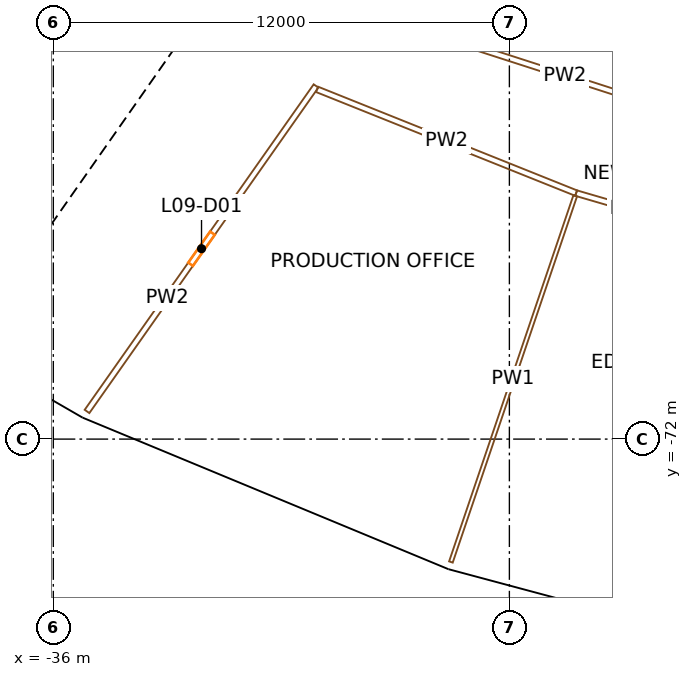
"""IFC4 building model, lengths in metres.
Left out: names, types, materials, properties, quantities, classifications, styles, units other than length and angle.
Written with IfcOpenShell. Run it as: python <this file> out.ifc"""

import sys

from ifc_helpers import new_model, si_unit, direction, frame, frame_2d, origin, origin_2d, place, context, subcontext, project, spatial, rectangle, extrude, element, fill, save


model = new_model("IFC4")
c1 = context("Model", 3, precision=1e-05, world=origin(), true_north=direction((0.0, 1.0)))
c2 = subcontext(c1, "Body", "Model", "MODEL_VIEW")
j1 = project(units=[si_unit("LENGTHUNIT", "METRE"), si_unit("PLANEANGLEUNIT", "RADIAN")], contexts=[c1])
p1 = place(None, origin())
s1 = spatial("IfcSite", under=j1, at=p1, CompositionType="ELEMENT")
p2 = place(p1, origin())
s2 = spatial("IfcBuilding", under=s1, at=p2, CompositionType="ELEMENT")
p3 = place(p2, frame((0.0, 0.0, 51.9)))
s3 = spatial("IfcBuildingStorey", under=s2, at=p3, CompositionType="ELEMENT", Elevation=51.9)
for number, where, z_axis, x_axis in (
    (1, (-34.388, -69.732, 0.0), (0.0, 0.0, 1.0), (0.897, -0.442, 0.0)),
    (2, (-24.992, -73.624, 0.0), (0.0, 0.0, 1.0), (0.947, -0.321, 0.0)),
):
    element("IfcColumn", number, at=place(p3, frame(where, z_axis=z_axis, x_axis=x_axis)), inside=s3, PredefinedType="COLUMN", context=c2, shape_type="SweptSolid", body=[
        extrude(rectangle(XDim=1.3, YDim=1.7, at=origin_2d()), origin(), (0.0, 0.0, 1.0), 3.8),
    ])
p4 = place(p3, frame((-36.717, -66.337, 0.0), z_axis=(0.0, 0.0, 1.0), x_axis=(0.573577477574, 0.819151315216, 0.0)))
e3 = element("IfcWall", 3, at=p4, inside=s3, PredefinedType="SHEAR", context=c2, shape_type="SweptSolid", body=[
    extrude(rectangle(XDim=14.8, YDim=0.9, at=frame_2d((7.4, 0.0))), origin(), (0.0, 0.0, 1.0), 3.5),
])
p5 = place(p4, frame((6.2, 0.0, 0.0)))
e4 = element("IfcOpeningElement", 4, at=p5, cuts=e3, PredefinedType="OPENING", context=c2, shape_type="SweptSolid", body=[
    extrude(rectangle(XDim=2.4, YDim=2.1, at=frame_2d((1.2, 1.05))), frame((0.0, 0.46, 0.0), z_axis=(0.0, -1.0, 0.0), x_axis=(1.0, 0.0, 0.0)), (0.0, 0.0, 1.0), 0.92),
])
p6 = place(p3, frame((-35.221, -63.417, 0.0), z_axis=(0.0, 0.0, 1.0), x_axis=(-0.819166993208, 0.573555086491, 0.0)))
e5 = element("IfcWall", 5, at=p6, inside=s3, PredefinedType="SOLIDWALL", context=c2, shape_type="SweptSolid", body=[
    extrude(rectangle(XDim=7.95, YDim=0.3, at=frame_2d((3.975, 0.0))), origin(), (0.0, 0.0, 1.0), 3.5),
])
p7 = place(p3, frame((-29.088, -62.708, 0.0), z_axis=(0.0, 0.0, 1.0), x_axis=(-0.575411972256, -0.817863718589, 0.0)))
e6 = element("IfcWall", 6, at=p7, inside=s3, PredefinedType="PARTITIONING", context=c2, shape_type="SweptSolid", body=[
    extrude(rectangle(XDim=10.471, YDim=0.15, at=frame_2d((5.236, 0.0))), origin(), (0.0, 0.0, 1.0), 2.4),
])
p8 = place(p7, frame((4.736, 0.0, 0.0)))
e7 = element("IfcOpeningElement", 7, at=p8, cuts=e6, PredefinedType="OPENING", context=c2, shape_type="SweptSolid", body=[
    extrude(rectangle(XDim=1.0, YDim=2.1, at=frame_2d((0.5, 1.05))), frame((0.0, 0.085, 0.0), z_axis=(0.0, -1.0, 0.0), x_axis=(1.0, 0.0, 0.0)), (0.0, 0.0, 1.0), 0.17),
])
p9 = place(p3, frame((-29.061, -62.798, 0.0), z_axis=(0.0, 0.0, 1.0), x_axis=(0.928339065762, -0.371734554462, 0.0)))
e8 = element("IfcWall", 8, at=p9, inside=s3, PredefinedType="PARTITIONING", context=c2, shape_type="SweptSolid", body=[
    extrude(rectangle(XDim=7.344, YDim=0.15, at=frame_2d((3.672, 0.0))), origin(), (0.0, 0.0, 1.0), 2.4),
])
p10 = place(p3, frame((-27.656, -60.797, 0.0), z_axis=(0.0, 0.0, 1.0), x_axis=(0.951666530015, -0.307133221338, 0.0)))
e9 = element("IfcWall", 9, at=p10, inside=s3, PredefinedType="PARTITIONING", context=c2, shape_type="SweptSolid", body=[
    extrude(rectangle(XDim=15.366, YDim=0.15, at=frame_2d((7.683, 0.0))), origin(), (0.0, 0.0, 1.0), 2.4),
])
p11 = place(p10, frame((6.783, 0.0, 0.0)))
e10 = element("IfcOpeningElement", 10, at=p11, cuts=e9, PredefinedType="OPENING", context=c2, shape_type="SweptSolid", body=[
    extrude(rectangle(XDim=1.8, YDim=2.1, at=frame_2d((0.9, 1.05))), frame((0.0, 0.085, 0.0), z_axis=(0.0, -1.0, 0.0), x_axis=(1.0, 0.0, 0.0)), (0.0, 0.0, 1.0), 0.17),
])
p12 = place(p3, frame((-25.538, -75.234, 0.0), z_axis=(0.0, 0.0, 1.0), x_axis=(0.32142736677, 0.946934236308, 0.0)))
e11 = element("IfcWall", 11, at=p12, inside=s3, PredefinedType="PARTITIONING", context=c2, shape_type="SweptSolid", body=[
    extrude(rectangle(XDim=10.175, YDim=0.1, at=frame_2d((5.087, 0.0))), origin(), (0.0, 0.0, 1.0), 2.4),
])
p13 = place(p3, frame((-16.446, -67.217, 0.0), z_axis=(0.0, 0.0, 1.0), x_axis=(-0.960056580345, 0.279805937279, 0.0)))
e12 = element("IfcWall", 12, at=p13, inside=s3, PredefinedType="PARTITIONING", context=c2, shape_type="SweptSolid", body=[
    extrude(rectangle(XDim=6.039, YDim=0.15, at=frame_2d((3.02, 0.0))), origin(), (0.0, 0.0, 1.0), 2.4),
])
p14 = place(p13, frame((2.52, 0.0, 0.0)))
e13 = element("IfcOpeningElement", 13, at=p14, cuts=e12, PredefinedType="OPENING", context=c2, shape_type="SweptSolid", body=[
    extrude(rectangle(XDim=1.0, YDim=2.1, at=frame_2d((0.5, 1.05))), frame((0.0, 0.085, 0.0), z_axis=(0.0, -1.0, 0.0), x_axis=(1.0, 0.0, 0.0)), (0.0, 0.0, 1.0), 0.17),
])
p15 = place(p8, origin())
e14 = element("IfcDoor", 14, at=p15, inside=s3, OperationType="SINGLE_SWING_RIGHT", PredefinedType="DOOR", context=c2, shape_type="SweptSolid", body=[
    extrude(rectangle(XDim=1.0, YDim=2.1, at=frame_2d((0.5, 1.05))), frame((0.0, 0.025, 0.0), z_axis=(0.0, -1.0, 0.0), x_axis=(1.0, 0.0, 0.0)), (0.0, 0.0, 1.0), 0.05),
])
fill(e7, e14)
save(model, sys.argv[1])
